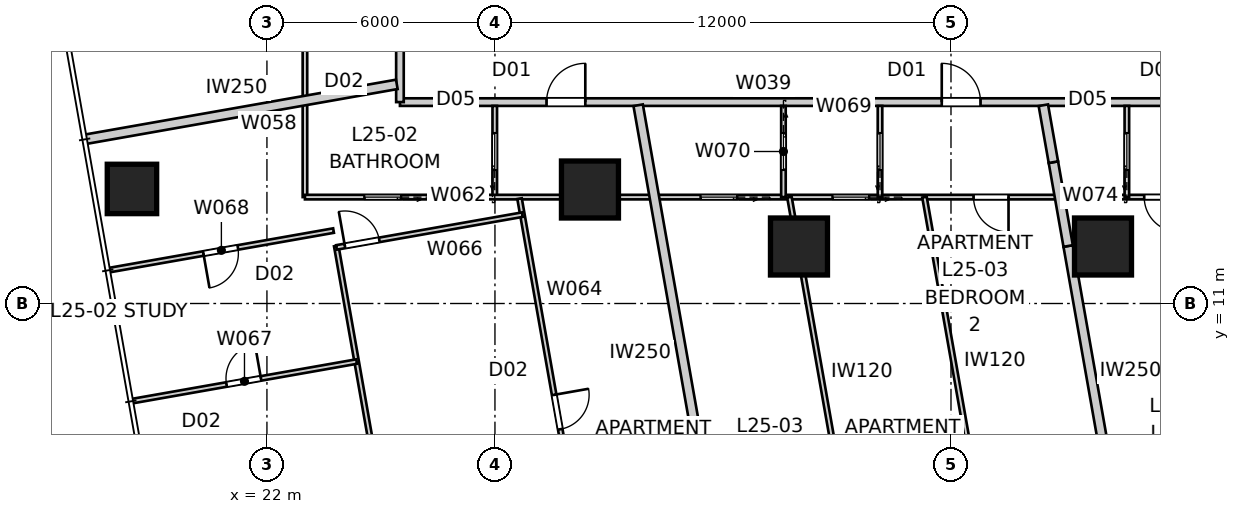
"""IFC4 building model, lengths in metres.
Left out: names, types, materials, properties, quantities, classifications, styles, units other than length and angle.
Written with IfcOpenShell. Run it as: python <this file> out.ifc"""

import sys

from ifc_helpers import new_model, si_unit, direction, frame, frame_2d, origin, origin_2d, place, context, subcontext, project, spatial, rectangle, extrude, element, fill, save


model = new_model("IFC4")
c1 = context("Model", 3, precision=1e-05, world=origin(), true_north=direction((0.0, 1.0)))
c2 = subcontext(c1, "Body", "Model", "MODEL_VIEW")
j1 = project(units=[si_unit("LENGTHUNIT", "METRE"), si_unit("PLANEANGLEUNIT", "RADIAN")], contexts=[c1])
p1 = place(None, origin())
s1 = spatial("IfcSite", under=j1, at=p1, CompositionType="ELEMENT")
p2 = place(p1, origin())
s2 = spatial("IfcBuilding", under=s1, at=p2, CompositionType="ELEMENT")
p3 = place(p2, frame((0.0, 0.0, 93.0)))
s3 = spatial("IfcBuildingStorey", under=s2, at=p3, CompositionType="ELEMENT", Elevation=93.0)
p4 = place(p3, frame((18.448, 14.015, 0.0), z_axis=(0.0, 0.0, 1.0), x_axis=(1.0, 0.0, 0.0)))
e1 = element("IfcColumn", 1, at=p4, inside=s3, PredefinedType="COLUMN", context=c2, shape_type="SweptSolid", body=[
    extrude(rectangle(XDim=1.3, YDim=1.3, at=origin_2d()), origin(), (0.0, 0.0, 1.0), 3.4),
])
for number, where, z_axis, x_axis in (
    (2, (30.5, 14.0, 0.0), (0.0, 0.0, 1.0), (1.0, 0.0, 0.0)),
    (3, (36.0, 12.5, 0.0), (0.0, 0.0, 1.0), (1.0, 0.0, 0.0)),
    (4, (44.0, 12.5, 0.0), (0.0, 0.0, 1.0), (1.0, 0.0, 0.0)),
):
    element("IfcColumn", number, at=place(p3, frame(where, z_axis=z_axis, x_axis=x_axis)), inside=s3, PredefinedType="COLUMN", context=c2, shape_type="SweptSolid", body=[
        extrude(rectangle(XDim=1.5, YDim=1.5, at=origin_2d()), origin(), (0.0, 0.0, 1.0), 3.4),
    ])
p5 = place(p3, frame((25.5, 16.3, 0.0), z_axis=(0.0, 0.0, 1.0), x_axis=(1.0, 0.0, 0.0)))
e5 = element("IfcWall", 5, at=p5, inside=s3, PredefinedType="PARTITIONING", context=c2, shape_type="SweptSolid", body=[
    extrude(rectangle(XDim=29.0, YDim=0.2, at=frame_2d((14.5, 0.0))), origin(), (0.0, 0.0, 1.0), 3.25),
])
p6 = place(p5, frame((20.896, 0.0, 0.0)))
e6 = element("IfcOpeningElement", 6, at=p6, cuts=e5, PredefinedType="OPENING", context=c2, shape_type="SweptSolid", body=[
    extrude(rectangle(XDim=1.02, YDim=2.34, at=frame_2d((0.51, 1.17))), frame((0.0, 0.11, 0.0), z_axis=(0.0, -1.0, 0.0), x_axis=(1.0, 0.0, 0.0)), (0.0, 0.0, 1.0), 0.22),
])
p7 = place(p5, frame((14.257, 0.0, 0.0)))
e7 = element("IfcOpeningElement", 7, at=p7, cuts=e5, PredefinedType="OPENING", context=c2, shape_type="SweptSolid", body=[
    extrude(rectangle(XDim=1.02, YDim=2.34, at=frame_2d((0.51, 1.17))), frame((0.0, 0.11, 0.0), z_axis=(0.0, -1.0, 0.0), x_axis=(1.0, 0.0, 0.0)), (0.0, 0.0, 1.0), 0.22),
])
p8 = place(p5, frame((3.857, 0.0, 0.0)))
e8 = element("IfcOpeningElement", 8, at=p8, cuts=e5, PredefinedType="OPENING", context=c2, shape_type="SweptSolid", body=[
    extrude(rectangle(XDim=1.02, YDim=2.34, at=frame_2d((0.51, 1.17))), frame((0.0, 0.11, 0.0), z_axis=(0.0, -1.0, 0.0), x_axis=(1.0, 0.0, 0.0)), (0.0, 0.0, 1.0), 0.22),
])
p9 = place(p3, frame((25.5, 43.7, 0.0), z_axis=(0.0, 0.0, 1.0), x_axis=(0.0, -1.0, 0.0)))
e9 = element("IfcWall", 9, at=p9, inside=s3, PredefinedType="PARTITIONING", context=c2, shape_type="SweptSolid", body=[
    extrude(rectangle(XDim=27.4, YDim=0.2, at=frame_2d((13.7, 0.0))), origin(), (0.0, 0.0, 1.0), 3.25),
])
p10 = place(p9, frame((24.333, 0.0, 0.0)))
e10 = element("IfcOpeningElement", 10, at=p10, cuts=e9, PredefinedType="OPENING", context=c2, shape_type="SweptSolid", body=[
    extrude(rectangle(XDim=1.02, YDim=2.1, at=frame_2d((0.51, 1.05))), frame((0.0, 0.11, 0.0), z_axis=(0.0, -1.0, 0.0), x_axis=(1.0, 0.0, 0.0)), (0.0, 0.0, 1.0), 0.22),
])
p11 = place(p9, frame((10.631, 0.0, 0.0)))
e11 = element("IfcOpeningElement", 11, at=p11, cuts=e9, PredefinedType="OPENING", context=c2, shape_type="SweptSolid", body=[
    extrude(rectangle(XDim=1.02, YDim=2.34, at=frame_2d((0.51, 1.17))), frame((0.0, 0.11, 0.0), z_axis=(0.0, -1.0, 0.0), x_axis=(1.0, 0.0, 0.0)), (0.0, 0.0, 1.0), 0.22),
])
p12 = place(p9, frame((0.911, 0.0, 0.0)))
e12 = element("IfcOpeningElement", 12, at=p12, cuts=e9, PredefinedType="OPENING", context=c2, shape_type="SweptSolid", body=[
    extrude(rectangle(XDim=1.02, YDim=2.34, at=frame_2d((0.51, 1.17))), frame((0.0, 0.11, 0.0), z_axis=(0.0, -1.0, 0.0), x_axis=(1.0, 0.0, 0.0)), (0.0, 0.0, 1.0), 0.22),
])
p13 = place(p3, frame((44.341, 5.38, 0.0), z_axis=(0.0, 0.0, 1.0), x_axis=(-0.173677660443, 0.984802553948, 0.0)))
e13 = element("IfcWall", 13, at=p13, inside=s3, PredefinedType="PARTITIONING", context=c2, shape_type="SweptSolid", body=[
    extrude(rectangle(XDim=7.244, YDim=0.25, at=frame_2d((3.622, 0.0))), origin(), (0.0, 0.0, 1.0), 3.25),
])
p14 = place(p3, frame((43.083, 12.513, 0.0), z_axis=(0.0, 0.0, 1.0), x_axis=(-0.17363609779, 0.984809882944, 0.0)))
e14 = element("IfcWall", 14, at=p14, inside=s3, PredefinedType="PARTITIONING", context=c2, shape_type="SweptSolid", body=[
    extrude(rectangle(XDim=2.24, YDim=0.25, at=frame_2d((1.12, 0.0))), origin(), (0.0, 0.0, 1.0), 2.795),
])
p15 = place(p3, frame((42.694, 14.719, 0.0), z_axis=(0.0, 0.0, 1.0), x_axis=(-0.173602272028, 0.984815846312, 0.0)))
e15 = element("IfcWall", 15, at=p15, inside=s3, PredefinedType="PARTITIONING", context=c2, shape_type="SweptSolid", body=[
    extrude(rectangle(XDim=1.522, YDim=0.25, at=frame_2d((0.761, 0.0))), origin(), (0.0, 0.0, 1.0), 3.25),
])
p16 = place(p3, frame((34.001, 3.556, 0.0), z_axis=(0.0, 0.0, 1.0), x_axis=(-0.173639088111, 0.984809355703, 0.0)))
e16 = element("IfcWall", 16, at=p16, inside=s3, PredefinedType="PARTITIONING", context=c2, shape_type="SweptSolid", body=[
    extrude(rectangle(XDim=12.857, YDim=0.25, at=frame_2d((6.428, 0.0))), origin(), (0.0, 0.0, 1.0), 3.25),
])
p17 = place(p3, frame((17.203, 15.318, 0.0), z_axis=(0.0, 0.0, 1.0), x_axis=(0.984807121942, 0.173651756605, 0.0)))
e17 = element("IfcWall", 17, at=p17, inside=s3, PredefinedType="PARTITIONING", context=c2, shape_type="SweptSolid", body=[
    extrude(rectangle(XDim=8.341, YDim=0.25, at=frame_2d((4.171, 0.0))), origin(), (0.0, 0.0, 1.0), 3.25),
])
p18 = place(p3, frame((23.0, 13.8, 0.0), z_axis=(0.0, 0.0, 1.0), x_axis=(0.0, 1.0, 0.0)))
e18 = element("IfcWall", 18, at=p18, inside=s3, PredefinedType="PARTITIONING", context=c2, shape_type="SweptSolid", body=[
    extrude(rectangle(XDim=6.094, YDim=0.12, at=frame_2d((3.047, 0.0))), origin(), (0.0, 0.0, 1.0), 3.25),
])
p19 = place(p18, frame((3.857, 0.0, 0.0)))
e19 = element("IfcOpeningElement", 19, at=p19, cuts=e18, PredefinedType="OPENING", context=c2, shape_type="SweptSolid", body=[
    extrude(rectangle(XDim=0.92, YDim=2.34, at=frame_2d((0.46, 1.17))), frame((0.0, 0.07, 0.0), z_axis=(0.0, -1.0, 0.0), x_axis=(1.0, 0.0, 0.0)), (0.0, 0.0, 1.0), 0.14),
])
p20 = place(p3, frame((27.995, 13.8, 0.0), z_axis=(0.0, 0.0, 1.0), x_axis=(0.0, 1.0, 0.0)))
e20 = element("IfcWall", 20, at=p20, inside=s3, PredefinedType="PARTITIONING", context=c2, shape_type="SweptSolid", body=[
    extrude(rectangle(XDim=2.4, YDim=0.12, at=frame_2d((1.2, 0.0))), origin(), (0.0, 0.0, 1.0), 3.25),
])
p21 = place(p20, frame((0.72, 0.0, 0.0)))
e21 = element("IfcOpeningElement", 21, at=p21, cuts=e20, PredefinedType="OPENING", context=c2, shape_type="SweptSolid", body=[
    extrude(rectangle(XDim=0.96, YDim=2.1, at=frame_2d((0.48, 1.05))), frame((0.0, 0.07, 0.0), z_axis=(0.0, -1.0, 0.0), x_axis=(1.0, 0.0, 0.0)), (0.0, 0.0, 1.0), 0.14),
])
p22 = place(p3, frame((57.0, 13.8, 0.0), z_axis=(0.0, 0.0, 1.0), x_axis=(-1.0, 0.0, 0.0)))
e22 = element("IfcWall", 22, at=p22, inside=s3, PredefinedType="PARTITIONING", context=c2, shape_type="SweptSolid", body=[
    extrude(rectangle(XDim=34.0, YDim=0.12, at=frame_2d((17.0, 0.0))), origin(), (0.0, 0.0, 1.0), 2.55),
])
p23 = place(p22, frame((8.768, 0.0, 0.0)))
e23 = element("IfcOpeningElement", 23, at=p23, cuts=e22, PredefinedType="OPENING", context=c2, shape_type="SweptSolid", body=[
    extrude(rectangle(XDim=0.92, YDim=2.34, at=frame_2d((0.46, 1.17))), frame((0.0, 0.07, 0.0), z_axis=(0.0, -1.0, 0.0), x_axis=(1.0, 0.0, 0.0)), (0.0, 0.0, 1.0), 0.14),
])
p24 = place(p22, frame((10.995, 0.0, 0.0)))
e24 = element("IfcOpeningElement", 24, at=p24, cuts=e22, PredefinedType="OPENING", context=c2, shape_type="SweptSolid", body=[
    extrude(rectangle(XDim=0.92, YDim=2.34, at=frame_2d((0.46, 1.17))), frame((0.0, 0.07, 0.0), z_axis=(0.0, -1.0, 0.0), x_axis=(1.0, 0.0, 0.0)), (0.0, 0.0, 1.0), 0.14),
])
p25 = place(p22, frame((15.486, 0.0, 0.0)))
e25 = element("IfcOpeningElement", 25, at=p25, cuts=e22, PredefinedType="OPENING", context=c2, shape_type="SweptSolid", body=[
    extrude(rectangle(XDim=0.92, YDim=2.34, at=frame_2d((0.46, 1.17))), frame((0.0, 0.07, 0.0), z_axis=(0.0, -1.0, 0.0), x_axis=(1.0, 0.0, 0.0)), (0.0, 0.0, 1.0), 0.14),
])
p26 = place(p22, frame((4.804, 0.0, 0.0)))
e26 = element("IfcOpeningElement", 26, at=p26, cuts=e22, PredefinedType="OPENING", context=c2, shape_type="SweptSolid", body=[
    extrude(rectangle(XDim=0.96, YDim=2.1, at=frame_2d((0.48, 1.05))), frame((0.0, 0.07, 0.0), z_axis=(0.0, -1.0, 0.0), x_axis=(1.0, 0.0, 0.0)), (0.0, 0.0, 1.0), 0.14),
])
p27 = place(p22, frame((19.155, 0.0, 0.0)))
e27 = element("IfcOpeningElement", 27, at=p27, cuts=e22, PredefinedType="OPENING", context=c2, shape_type="SweptSolid", body=[
    extrude(rectangle(XDim=0.96, YDim=2.1, at=frame_2d((0.48, 1.05))), frame((0.0, 0.07, 0.0), z_axis=(0.0, -1.0, 0.0), x_axis=(1.0, 0.0, 0.0)), (0.0, 0.0, 1.0), 0.14),
])
p28 = place(p22, frame((31.473, 0.0, 0.0)))
e28 = element("IfcOpeningElement", 28, at=p28, cuts=e22, PredefinedType="OPENING", context=c2, shape_type="SweptSolid", body=[
    extrude(rectangle(XDim=0.96, YDim=2.1, at=frame_2d((0.48, 1.05))), frame((0.0, 0.07, 0.0), z_axis=(0.0, -1.0, 0.0), x_axis=(1.0, 0.0, 0.0)), (0.0, 0.0, 1.0), 0.14),
])
p29 = place(p22, frame((1.261, 0.0, 0.0)))
e29 = element("IfcOpeningElement", 29, at=p29, cuts=e22, PredefinedType="OPENING", context=c2, shape_type="SweptSolid", body=[
    extrude(rectangle(XDim=0.96, YDim=2.1, at=frame_2d((0.48, 1.05))), frame((0.0, 0.07, 0.0), z_axis=(0.0, -1.0, 0.0), x_axis=(1.0, 0.0, 0.0)), (0.0, 0.0, 1.0), 0.14),
])
p30 = place(p22, frame((22.627, 0.0, 0.0)))
e30 = element("IfcOpeningElement", 30, at=p30, cuts=e22, PredefinedType="OPENING", context=c2, shape_type="SweptSolid", body=[
    extrude(rectangle(XDim=0.96, YDim=2.1, at=frame_2d((0.48, 1.05))), frame((0.0, 0.07, 0.0), z_axis=(0.0, -1.0, 0.0), x_axis=(1.0, 0.0, 0.0)), (0.0, 0.0, 1.0), 0.14),
])
p31 = place(p3, frame((28.648, 13.76, 0.0), z_axis=(0.0, 0.0, 1.0), x_axis=(0.173632532564, -0.984810511538, 0.0)))
e31 = element("IfcWall", 31, at=p31, inside=s3, PredefinedType="PARTITIONING", context=c2, shape_type="SweptSolid", body=[
    extrude(rectangle(XDim=10.938, YDim=0.12, at=frame_2d((5.469, 0.0))), origin(), (0.0, 0.0, 1.0), 2.638),
])
p32 = place(p31, frame((5.243, 0.0, 0.0)))
e32 = element("IfcOpeningElement", 32, at=p32, cuts=e31, PredefinedType="OPENING", context=c2, shape_type="SweptSolid", body=[
    extrude(rectangle(XDim=0.92, YDim=2.34, at=frame_2d((0.46, 1.17))), frame((0.0, 0.07, 0.0), z_axis=(0.0, -1.0, 0.0), x_axis=(1.0, 0.0, 0.0)), (0.0, 0.0, 1.0), 0.14),
])
p33 = place(p3, frame((25.656, 2.126, 0.0), z_axis=(0.0, 0.0, 1.0), x_axis=(-0.173653317458, 0.984806846715, 0.0)))
e33 = element("IfcWall", 33, at=p33, inside=s3, PredefinedType="PARTITIONING", context=c2, shape_type="SweptSolid", body=[
    extrude(rectangle(XDim=10.55, YDim=0.12, at=frame_2d((5.275, 0.0))), origin(), (0.0, 0.0, 1.0), 3.25),
])
p34 = place(p3, frame((23.831, 12.476, 0.0), z_axis=(0.0, 0.0, 1.0), x_axis=(0.984810765884, 0.173631089957, 0.0)))
e34 = element("IfcWall", 34, at=p34, inside=s3, PredefinedType="PARTITIONING", context=c2, shape_type="SweptSolid", body=[
    extrude(rectangle(XDim=4.966, YDim=0.12, at=frame_2d((2.483, 0.0))), origin(), (0.0, 0.0, 1.0), 3.25),
])
p35 = place(p34, frame((0.223, 0.0, 0.0)))
e35 = element("IfcOpeningElement", 35, at=p35, cuts=e34, PredefinedType="OPENING", context=c2, shape_type="SweptSolid", body=[
    extrude(rectangle(XDim=0.92, YDim=2.34, at=frame_2d((0.46, 1.17))), frame((0.0, 0.07, 0.0), z_axis=(0.0, -1.0, 0.0), x_axis=(1.0, 0.0, 0.0)), (0.0, 0.0, 1.0), 0.14),
])
p36 = place(p3, frame((18.458, 8.432, 0.0), z_axis=(0.0, 0.0, 1.0), x_axis=(0.984806924634, 0.173652875567, 0.0)))
e36 = element("IfcWall", 36, at=p36, inside=s3, PredefinedType="PARTITIONING", context=c2, shape_type="SweptSolid", body=[
    extrude(rectangle(XDim=5.993, YDim=0.12, at=frame_2d((2.997, 0.0))), origin(), (0.0, 0.0, 1.0), 3.25),
])
p37 = place(p36, frame((2.517, 0.0, 0.0)))
e37 = element("IfcOpeningElement", 37, at=p37, cuts=e36, PredefinedType="OPENING", context=c2, shape_type="SweptSolid", body=[
    extrude(rectangle(XDim=0.92, YDim=2.34, at=frame_2d((0.46, 1.17))), frame((0.0, 0.07, 0.0), z_axis=(0.0, -1.0, 0.0), x_axis=(1.0, 0.0, 0.0)), (0.0, 0.0, 1.0), 0.14),
])
p38 = place(p3, frame((23.753, 12.919, 0.0), z_axis=(0.0, 0.0, 1.0), x_axis=(-0.984806924634, -0.173652875567, 0.0)))
e38 = element("IfcWall", 38, at=p38, inside=s3, PredefinedType="PARTITIONING", context=c2, shape_type="SweptSolid", body=[
    extrude(rectangle(XDim=5.993, YDim=0.12, at=frame_2d((2.997, 0.0))), origin(), (0.0, 0.0, 1.0), 2.638),
])
p39 = place(p38, frame((2.557, 0.0, 0.0)))
e39 = element("IfcOpeningElement", 39, at=p39, cuts=e38, PredefinedType="OPENING", context=c2, shape_type="SweptSolid", body=[
    extrude(rectangle(XDim=0.92, YDim=2.34, at=frame_2d((0.46, 1.17))), frame((0.0, 0.07, 0.0), z_axis=(0.0, -1.0, 0.0), x_axis=(1.0, 0.0, 0.0)), (0.0, 0.0, 1.0), 0.14),
])
p40 = place(p3, frame((38.132, 13.8, 0.0), z_axis=(0.0, 0.0, 1.0), x_axis=(0.0, 1.0, 0.0)))
e40 = element("IfcWall", 40, at=p40, inside=s3, PredefinedType="PARTITIONING", context=c2, shape_type="SweptSolid", body=[
    extrude(rectangle(XDim=2.4, YDim=0.12, at=frame_2d((1.2, 0.0))), origin(), (0.0, 0.0, 1.0), 3.25),
])
p41 = place(p40, frame((0.72, 0.0, 0.0)))
e41 = element("IfcOpeningElement", 41, at=p41, cuts=e40, PredefinedType="OPENING", context=c2, shape_type="SweptSolid", body=[
    extrude(rectangle(XDim=0.96, YDim=2.1, at=frame_2d((0.48, 1.05))), frame((0.0, 0.07, 0.0), z_axis=(0.0, -1.0, 0.0), x_axis=(1.0, 0.0, 0.0)), (0.0, 0.0, 1.0), 0.14),
])
p42 = place(p3, frame((35.591, 16.2, 0.0), z_axis=(0.0, 0.0, 1.0), x_axis=(0.0, -1.0, 0.0)))
e42 = element("IfcWall", 42, at=p42, inside=s3, PredefinedType="PARTITIONING", context=c2, shape_type="SweptSolid", body=[
    extrude(rectangle(XDim=2.4, YDim=0.12, at=frame_2d((1.2, 0.0))), origin(), (0.0, 0.0, 1.0), 3.25),
])
p43 = place(p42, frame((0.72, 0.0, 0.0)))
e43 = element("IfcOpeningElement", 43, at=p43, cuts=e42, PredefinedType="OPENING", context=c2, shape_type="SweptSolid", body=[
    extrude(rectangle(XDim=0.96, YDim=2.1, at=frame_2d((0.48, 1.05))), frame((0.0, 0.07, 0.0), z_axis=(0.0, -1.0, 0.0), x_axis=(1.0, 0.0, 0.0)), (0.0, 0.0, 1.0), 0.14),
])
p44 = place(p3, frame((35.749, 13.8, 0.0), z_axis=(0.0, 0.0, 1.0), x_axis=(0.173650980998, -0.984807258705, 0.0)))
e44 = element("IfcWall", 44, at=p44, inside=s3, PredefinedType="PARTITIONING", context=c2, shape_type="SweptSolid", body=[
    extrude(rectangle(XDim=9.744, YDim=0.12, at=frame_2d((4.872, 0.0))), origin(), (0.0, 0.0, 1.0), 3.25),
])
p45 = place(p3, frame((39.302, 13.8, 0.0), z_axis=(0.0, 0.0, 1.0), x_axis=(0.173652576186, -0.984806977424, 0.0)))
e45 = element("IfcWall", 45, at=p45, inside=s3, PredefinedType="PARTITIONING", context=c2, shape_type="SweptSolid", body=[
    extrude(rectangle(XDim=9.127, YDim=0.12, at=frame_2d((4.563, 0.0))), origin(), (0.0, 0.0, 1.0), 3.25),
])
p46 = place(p3, frame((44.628, 13.8, 0.0), z_axis=(0.0, 0.0, 1.0), x_axis=(0.0, 1.0, 0.0)))
e46 = element("IfcWall", 46, at=p46, inside=s3, PredefinedType="PARTITIONING", context=c2, shape_type="SweptSolid", body=[
    extrude(rectangle(XDim=2.4, YDim=0.12, at=frame_2d((1.2, 0.0))), origin(), (0.0, 0.0, 1.0), 3.25),
])
p47 = place(p46, frame((0.72, 0.0, 0.0)))
e47 = element("IfcOpeningElement", 47, at=p47, cuts=e46, PredefinedType="OPENING", context=c2, shape_type="SweptSolid", body=[
    extrude(rectangle(XDim=0.96, YDim=2.1, at=frame_2d((0.48, 1.05))), frame((0.0, 0.07, 0.0), z_axis=(0.0, -1.0, 0.0), x_axis=(1.0, 0.0, 0.0)), (0.0, 0.0, 1.0), 0.14),
])
p48 = place(p7, origin())
e48 = element("IfcDoor", 48, at=p48, inside=s3, OperationType="SINGLE_SWING_LEFT", PredefinedType="DOOR", context=c2, shape_type="SweptSolid", body=[
    extrude(rectangle(XDim=1.02, YDim=2.34, at=frame_2d((0.51, 1.17))), frame((0.0, 0.025, 0.0), z_axis=(0.0, -1.0, 0.0), x_axis=(1.0, 0.0, 0.0)), (0.0, 0.0, 1.0), 0.05),
])
fill(e7, e48)
p49 = place(p8, origin())
e49 = element("IfcDoor", 49, at=p49, inside=s3, OperationType="SINGLE_SWING_RIGHT", PredefinedType="DOOR", context=c2, shape_type="SweptSolid", body=[
    extrude(rectangle(XDim=1.02, YDim=2.34, at=frame_2d((0.51, 1.17))), frame((0.0, 0.025, 0.0), z_axis=(0.0, -1.0, 0.0), x_axis=(1.0, 0.0, 0.0)), (0.0, 0.0, 1.0), 0.05),
])
fill(e8, e49)
p50 = place(p47, origin())
e50 = element("IfcDoor", 50, at=p50, inside=s3, OperationType="SLIDING_TO_LEFT", PredefinedType="DOOR", context=c2, shape_type="SweptSolid", body=[
    extrude(rectangle(XDim=0.96, YDim=2.1, at=frame_2d((0.48, 1.05))), frame((0.0, 0.025, 0.0), z_axis=(0.0, -1.0, 0.0), x_axis=(1.0, 0.0, 0.0)), (0.0, 0.0, 1.0), 0.05),
])
fill(e47, e50)
p51 = place(p24, origin())
e51 = element("IfcDoor", 51, at=p51, inside=s3, OperationType="SINGLE_SWING_LEFT", PredefinedType="DOOR", context=c2, shape_type="SweptSolid", body=[
    extrude(rectangle(XDim=0.92, YDim=2.34, at=frame_2d((0.46, 1.17))), frame((0.0, 0.025, 0.0), z_axis=(0.0, -1.0, 0.0), x_axis=(1.0, 0.0, 0.0)), (0.0, 0.0, 1.0), 0.05),
])
fill(e24, e51)
p52 = place(p25, origin())
e52 = element("IfcDoor", 52, at=p52, inside=s3, OperationType="SINGLE_SWING_LEFT", PredefinedType="DOOR", context=c2, shape_type="SweptSolid", body=[
    extrude(rectangle(XDim=0.92, YDim=2.34, at=frame_2d((0.46, 1.17))), frame((0.0, 0.025, 0.0), z_axis=(0.0, -1.0, 0.0), x_axis=(1.0, 0.0, 0.0)), (0.0, 0.0, 1.0), 0.05),
])
fill(e25, e52)
p53 = place(p41, origin())
e53 = element("IfcDoor", 53, at=p53, inside=s3, OperationType="SLIDING_TO_LEFT", PredefinedType="DOOR", context=c2, shape_type="SweptSolid", body=[
    extrude(rectangle(XDim=0.96, YDim=2.1, at=frame_2d((0.48, 1.05))), frame((0.0, 0.025, 0.0), z_axis=(0.0, -1.0, 0.0), x_axis=(1.0, 0.0, 0.0)), (0.0, 0.0, 1.0), 0.05),
])
fill(e41, e53)
p54 = place(p21, origin())
e54 = element("IfcDoor", 54, at=p54, inside=s3, OperationType="SLIDING_TO_LEFT", PredefinedType="DOOR", context=c2, shape_type="SweptSolid", body=[
    extrude(rectangle(XDim=0.96, YDim=2.1, at=frame_2d((0.48, 1.05))), frame((0.0, 0.025, 0.0), z_axis=(0.0, -1.0, 0.0), x_axis=(1.0, 0.0, 0.0)), (0.0, 0.0, 1.0), 0.05),
])
fill(e21, e54)
p55 = place(p27, origin())
e55 = element("IfcDoor", 55, at=p55, inside=s3, OperationType="SLIDING_TO_LEFT", PredefinedType="DOOR", context=c2, shape_type="SweptSolid", body=[
    extrude(rectangle(XDim=0.96, YDim=2.1, at=frame_2d((0.48, 1.05))), frame((0.0, 0.025, 0.0), z_axis=(0.0, -1.0, 0.0), x_axis=(1.0, 0.0, 0.0)), (0.0, 0.0, 1.0), 0.05),
])
fill(e27, e55)
p56 = place(p43, origin())
e56 = element("IfcDoor", 56, at=p56, inside=s3, OperationType="SLIDING_TO_LEFT", PredefinedType="DOOR", context=c2, shape_type="SweptSolid", body=[
    extrude(rectangle(XDim=0.96, YDim=2.1, at=frame_2d((0.48, 1.05))), frame((0.0, 0.025, 0.0), z_axis=(0.0, -1.0, 0.0), x_axis=(1.0, 0.0, 0.0)), (0.0, 0.0, 1.0), 0.05),
])
fill(e43, e56)
p57 = place(p28, origin())
e57 = element("IfcDoor", 57, at=p57, inside=s3, OperationType="SLIDING_TO_LEFT", PredefinedType="DOOR", context=c2, shape_type="SweptSolid", body=[
    extrude(rectangle(XDim=0.96, YDim=2.1, at=frame_2d((0.48, 1.05))), frame((0.0, 0.025, 0.0), z_axis=(0.0, -1.0, 0.0), x_axis=(1.0, 0.0, 0.0)), (0.0, 0.0, 1.0), 0.05),
])
fill(e28, e57)
p58 = place(p30, origin())
e58 = element("IfcDoor", 58, at=p58, inside=s3, OperationType="SLIDING_TO_LEFT", PredefinedType="DOOR", context=c2, shape_type="SweptSolid", body=[
    extrude(rectangle(XDim=0.96, YDim=2.1, at=frame_2d((0.48, 1.05))), frame((0.0, 0.025, 0.0), z_axis=(0.0, -1.0, 0.0), x_axis=(1.0, 0.0, 0.0)), (0.0, 0.0, 1.0), 0.05),
])
fill(e30, e58)
p59 = place(p39, origin())
e59 = element("IfcDoor", 59, at=p59, inside=s3, OperationType="SINGLE_SWING_RIGHT", PredefinedType="DOOR", context=c2, shape_type="SweptSolid", body=[
    extrude(rectangle(XDim=0.92, YDim=2.34, at=frame_2d((0.46, 1.17))), frame((0.0, 0.025, 0.0), z_axis=(0.0, -1.0, 0.0), x_axis=(1.0, 0.0, 0.0)), (0.0, 0.0, 1.0), 0.05),
])
fill(e39, e59)
p60 = place(p35, origin())
e60 = element("IfcDoor", 60, at=p60, inside=s3, OperationType="SINGLE_SWING_LEFT", PredefinedType="DOOR", context=c2, shape_type="SweptSolid", body=[
    extrude(rectangle(XDim=0.92, YDim=2.34, at=frame_2d((0.46, 1.17))), frame((0.0, 0.025, 0.0), z_axis=(0.0, -1.0, 0.0), x_axis=(1.0, 0.0, 0.0)), (0.0, 0.0, 1.0), 0.05),
])
fill(e35, e60)
p61 = place(p37, origin())
e61 = element("IfcDoor", 61, at=p61, inside=s3, OperationType="SINGLE_SWING_RIGHT", PredefinedType="DOOR", context=c2, shape_type="SweptSolid", body=[
    extrude(rectangle(XDim=0.92, YDim=2.34, at=frame_2d((0.46, 1.17))), frame((0.0, 0.025, 0.0), z_axis=(0.0, -1.0, 0.0), x_axis=(1.0, 0.0, 0.0)), (0.0, 0.0, 1.0), 0.05),
])
fill(e37, e61)
p62 = place(p32, origin())
e62 = element("IfcDoor", 62, at=p62, inside=s3, OperationType="SINGLE_SWING_LEFT", PredefinedType="DOOR", context=c2, shape_type="SweptSolid", body=[
    extrude(rectangle(XDim=0.92, YDim=2.34, at=frame_2d((0.46, 1.17))), frame((0.0, 0.025, 0.0), z_axis=(0.0, -1.0, 0.0), x_axis=(1.0, 0.0, 0.0)), (0.0, 0.0, 1.0), 0.05),
])
fill(e32, e62)
save(model, sys.argv[1])
